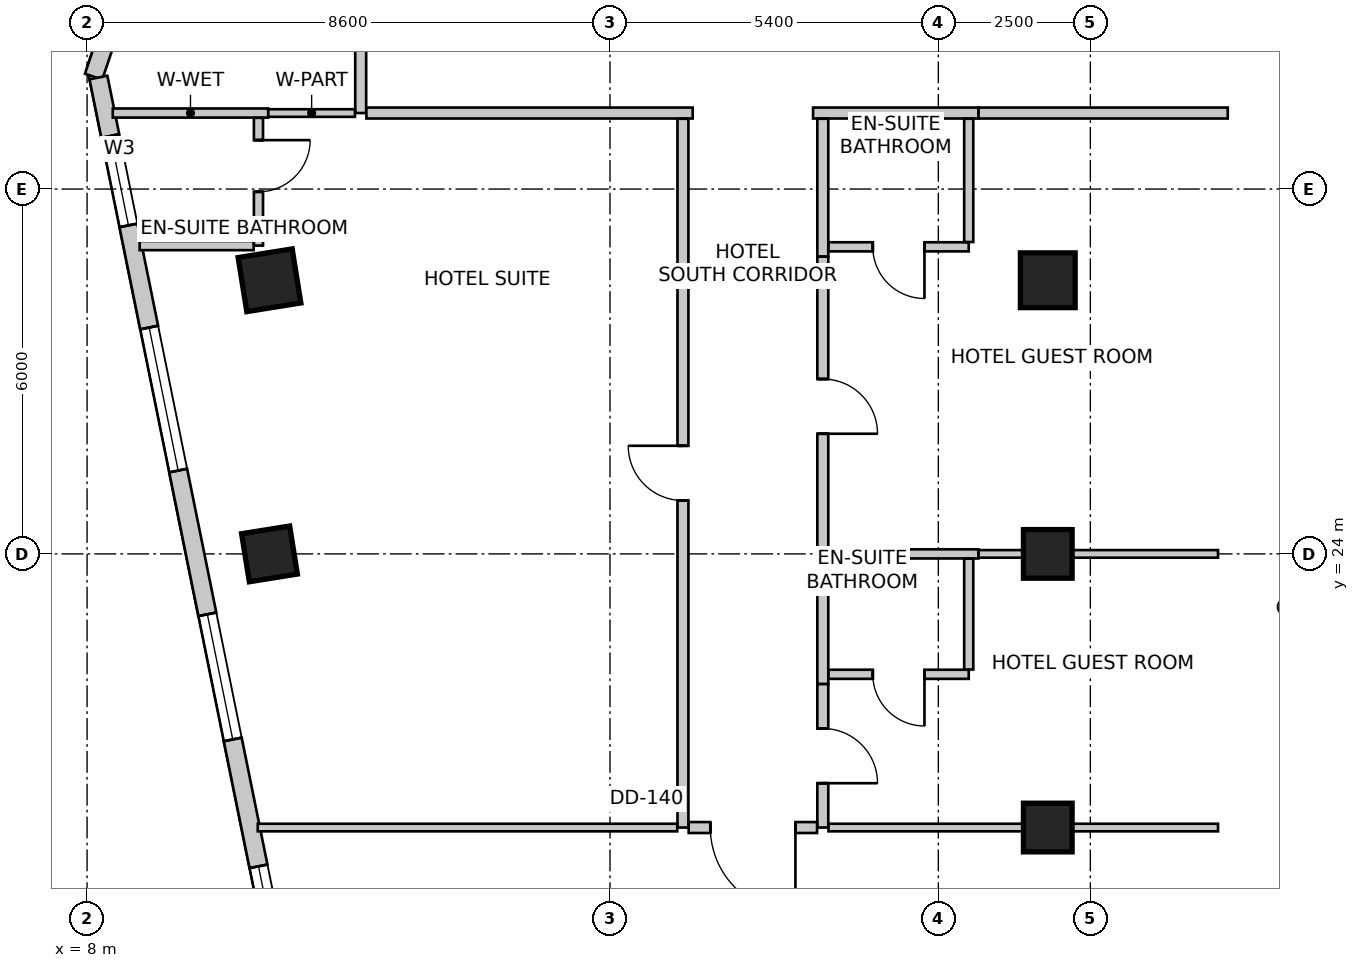
"""IFC4 building model, lengths in metres.
Left out: names, types, materials, properties, quantities, classifications, styles, units other than length and angle.
Written with IfcOpenShell. Run it as: python <this file> out.ifc"""

import sys

from ifc_helpers import new_model, si_unit, direction, frame, frame_2d, origin, origin_2d, place, context, subcontext, project, spatial, rectangle, extrude, source, transform, mapped, element, fill, save


model = new_model("IFC4")
c1 = context("Model", 3, precision=1e-05, world=origin(), true_north=direction((0.0, 1.0)))
c2 = subcontext(c1, "Body", "Model", "MODEL_VIEW")
j1 = project(units=[si_unit("LENGTHUNIT", "METRE"), si_unit("PLANEANGLEUNIT", "RADIAN")], contexts=[c1])
p1 = place(None, origin())
s1 = spatial("IfcSite", under=j1, at=p1, CompositionType="ELEMENT")
p2 = place(p1, origin())
s2 = spatial("IfcBuilding", under=s1, at=p2, CompositionType="ELEMENT")
p3 = place(p2, frame((0.0, 0.0, 143.0)))
s3 = spatial("IfcBuildingStorey", under=s2, at=p3, CompositionType="ELEMENT", Elevation=143.0)
m1 = source(origin(), c2, "Body", "SweptSolid", [
    extrude(rectangle(XDim=0.9, YDim=0.9, at=origin_2d()), origin(), (0.0, 0.0, 1.0), 3.6),
])
p4 = place(p3, frame((11.0, 28.5, 0.0), z_axis=(0.0, 0.0, 1.0), x_axis=(0.158158067254, -0.987413806751, 0.0)))
e1 = element("IfcColumn", 1, at=p4, inside=s3, PredefinedType="COLUMN", context=c2, shape_type="MappedRepresentation", body=[
    mapped(m1, transform((0.0, 0.0, 0.0), scale=1.0)),
])
m2 = source(origin(), c2, "Body", "SweptSolid", [
    extrude(rectangle(XDim=0.8, YDim=0.8, at=origin_2d()), origin(), (0.0, 0.0, 1.0), 3.6),
])
p5 = place(p3, frame((11.0, 24.0, 0.0), z_axis=(0.0, 0.0, 1.0), x_axis=(0.158158067254, -0.987413806751, 0.0)))
e2 = element("IfcColumn", 2, at=p5, inside=s3, PredefinedType="COLUMN", context=c2, shape_type="MappedRepresentation", body=[
    mapped(m2, transform((0.0, 0.0, 0.0), scale=1.0)),
])
p6 = place(p3, frame((23.8, 28.5, 0.0), z_axis=(0.0, 0.0, 1.0), x_axis=(1.0, 0.0, 0.0)))
e3 = element("IfcColumn", 3, at=p6, inside=s3, PredefinedType="COLUMN", context=c2, shape_type="MappedRepresentation", body=[
    mapped(m1, transform((0.0, 0.0, 0.0), scale=1.0)),
])
for number, where, z_axis, x_axis in (
    (4, (23.8, 24.0, 0.0), (0.0, 0.0, 1.0), (1.0, 0.0, 0.0)),
    (5, (23.8, 19.5, 0.0), (0.0, 0.0, 1.0), (1.0, 0.0, 0.0)),
):
    element("IfcColumn", number, at=place(p3, frame(where, z_axis=z_axis, x_axis=x_axis)), inside=s3, PredefinedType="COLUMN", context=c2, shape_type="MappedRepresentation", body=[
        mapped(m2, transform((0.0, 0.0, 0.0), scale=1.0)),
    ])
p7 = place(p3, frame((13.269, 47.134, 0.0), z_axis=(0.0, 0.0, 1.0), x_axis=(-0.319929773322, -0.947441259468, 0.0)))
e6 = element("IfcWall", 6, at=p7, inside=s3, PredefinedType="SOLIDWALL", context=c2, shape_type="SweptSolid", body=[
    extrude(rectangle(XDim=16.134, YDim=0.3, at=frame_2d((8.067, 0.0))), origin(), (0.0, 0.0, 1.0), 3.35),
])
m3 = source(origin(), c2, "Body", "SweptSolid", [
    extrude(rectangle(XDim=2.1, YDim=2.0, at=frame_2d((1.05, 1.0))), frame((0.0, 0.16, 0.0), z_axis=(0.0, -1.0, 0.0), x_axis=(1.0, 0.0, 0.0)), (0.0, 0.0, 1.0), 0.32),
])
p8 = place(p7, frame((2.426, 0.0, 0.85)))
e7 = element("IfcOpeningElement", 7, at=p8, cuts=e6, PredefinedType="OPENING", context=c2, shape_type="MappedRepresentation", body=[
    mapped(m3, transform((0.0, 0.0, 0.0), scale=1.0)),
])
m4 = source(origin(), c2, "Body", "SweptSolid", [
    extrude(rectangle(XDim=2.4, YDim=2.2, at=frame_2d((1.2, 1.1))), frame((0.0, 0.16, 0.0), z_axis=(0.0, -1.0, 0.0), x_axis=(1.0, 0.0, 0.0)), (0.0, 0.0, 1.0), 0.32),
])
p9 = place(p7, frame((7.211, 0.0, 0.85)))
e8 = element("IfcOpeningElement", 8, at=p9, cuts=e6, PredefinedType="OPENING", context=c2, shape_type="MappedRepresentation", body=[
    mapped(m4, transform((0.0, 0.0, 0.0), scale=1.0)),
])
p10 = place(p7, frame((12.296, 0.0, 0.85)))
e9 = element("IfcOpeningElement", 9, at=p10, cuts=e6, PredefinedType="OPENING", context=c2, shape_type="MappedRepresentation", body=[
    mapped(m3, transform((0.0, 0.0, 0.0), scale=1.0)),
])
p11 = place(p3, frame((8.187, 31.834, 0.0), z_axis=(0.0, 0.0, 1.0), x_axis=(0.198869838988, -0.980025911464, 0.0)))
e10 = element("IfcWall", 10, at=p11, inside=s3, PredefinedType="SOLIDWALL", context=c2, shape_type="SweptSolid", body=[
    extrude(rectangle(XDim=16.363, YDim=0.3, at=frame_2d((8.182, 0.0))), origin(), (0.0, 0.0, 1.0), 3.35),
])
m5 = source(origin(), c2, "Body", "SweptSolid", [
    extrude(rectangle(XDim=1.5, YDim=1.8, at=frame_2d((0.75, 0.9))), frame((0.0, 0.16, 0.0), z_axis=(0.0, -1.0, 0.0), x_axis=(1.0, 0.0, 0.0)), (0.0, 0.0, 1.0), 0.32),
])
p12 = place(p11, frame((0.981, 0.0, 0.85)))
e11 = element("IfcOpeningElement", 11, at=p12, cuts=e10, PredefinedType="OPENING", context=c2, shape_type="MappedRepresentation", body=[
    mapped(m5, transform((0.0, 0.0, 0.0), scale=1.0)),
])
p13 = place(p11, frame((4.195, 0.0, 0.85)))
e12 = element("IfcOpeningElement", 12, at=p13, cuts=e10, PredefinedType="OPENING", context=c2, shape_type="MappedRepresentation", body=[
    mapped(m4, transform((0.0, 0.0, 0.0), scale=1.0)),
])
p14 = place(p11, frame((9.007, 0.0, 0.85)))
e13 = element("IfcOpeningElement", 13, at=p14, cuts=e10, PredefinedType="OPENING", context=c2, shape_type="MappedRepresentation", body=[
    mapped(m3, transform((0.0, 0.0, 0.0), scale=1.0)),
])
p15 = place(p11, frame((13.236, 0.0, 0.85)))
e14 = element("IfcOpeningElement", 14, at=p15, cuts=e10, PredefinedType="OPENING", context=c2, shape_type="MappedRepresentation", body=[
    mapped(m4, transform((0.0, 0.0, 0.0), scale=1.0)),
])
p16 = place(p3, frame((12.5, 31.25, 0.0), z_axis=(0.0, 0.0, 1.0), x_axis=(0.0, 1.0, 0.0)))
e15 = element("IfcWall", 15, at=p16, inside=s3, PredefinedType="PARTITIONING", context=c2, shape_type="SweptSolid", body=[
    extrude(rectangle(XDim=2.2, YDim=0.18, at=frame_2d((1.1, 0.0))), origin(), (0.0, 0.0, 1.0), 3.034),
])
p17 = place(p3, frame((17.96, 31.25, 0.0), z_axis=(0.0, 0.0, 1.0), x_axis=(-1.0, 0.0, 0.0)))
e16 = element("IfcWall", 16, at=p17, inside=s3, PredefinedType="PARTITIONING", context=c2, shape_type="SweptSolid", body=[
    extrude(rectangle(XDim=5.366, YDim=0.18, at=frame_2d((2.683, 0.0))), origin(), (0.0, 0.0, 1.0), 3.034),
])
p18 = place(p3, frame((22.66, 31.25, 0.0), z_axis=(0.0, 0.0, 1.0), x_axis=(-1.0, 0.0, 0.0)))
e17 = element("IfcWall", 17, at=p18, inside=s3, PredefinedType="PARTITIONING", context=c2, shape_type="SweptSolid", body=[
    extrude(rectangle(XDim=2.72, YDim=0.18, at=frame_2d((1.36, 0.0))), origin(), (0.0, 0.0, 1.0), 3.034),
])
p19 = place(p3, frame((26.76, 31.25, 0.0), z_axis=(0.0, 0.0, 1.0), x_axis=(-1.0, 0.0, 0.0)))
e18 = element("IfcWall", 18, at=p19, inside=s3, PredefinedType="PARTITIONING", context=c2, shape_type="SweptSolid", body=[
    extrude(rectangle(XDim=4.098, YDim=0.18, at=frame_2d((2.049, 0.0))), origin(), (0.0, 0.0, 1.0), 3.35),
])
p20 = place(p3, frame((10.979, 31.25, 0.0), z_axis=(0.0, 0.0, 1.0), x_axis=(-1.0, 0.0, 0.0)))
e19 = element("IfcWall", 19, at=p20, inside=s3, PredefinedType="PARTITIONING", context=c2, shape_type="SweptSolid", body=[
    extrude(rectangle(XDim=2.556, YDim=0.15, at=frame_2d((1.278, 0.0))), origin(), (0.0, 0.0, 1.0), 2.492),
])
p21 = place(p3, frame((12.406, 31.25, 0.0), z_axis=(0.0, 0.0, 1.0), x_axis=(-1.0, 0.0, 0.0)))
e20 = element("IfcWall", 20, at=p21, inside=s3, PredefinedType="PARTITIONING", context=c2, shape_type="SweptSolid", body=[
    extrude(rectangle(XDim=1.426, YDim=0.125, at=frame_2d((0.713, 0.0))), origin(), (0.0, 0.0, 1.0), 2.492),
])
p22 = place(p3, frame((17.8, 19.5, 0.0), z_axis=(0.0, 0.0, 1.0), x_axis=(0.0, 1.0, 0.0)))
e21 = element("IfcWall", 21, at=p22, inside=s3, PredefinedType="PARTITIONING", context=c2, shape_type="SweptSolid", body=[
    extrude(rectangle(XDim=11.656, YDim=0.18, at=frame_2d((5.828, 0.0))), origin(), (0.0, 0.0, 1.0), 2.803),
])
m6 = source(origin(), c2, "Body", "SweptSolid", [
    extrude(rectangle(XDim=0.9, YDim=2.15, at=frame_2d((0.45, 1.075))), frame((0.0, 0.1, 0.0), z_axis=(0.0, -1.0, 0.0), x_axis=(1.0, 0.0, 0.0)), (0.0, 0.0, 1.0), 0.2),
])
p23 = place(p22, frame((5.378, 0.0, 0.0)))
e22 = element("IfcOpeningElement", 22, at=p23, cuts=e21, PredefinedType="OPENING", context=c2, shape_type="MappedRepresentation", body=[
    mapped(m6, transform((0.0, 0.0, 0.0), scale=1.0)),
])
p24 = place(p3, frame((20.1, 31.156, 0.0), z_axis=(0.0, 0.0, 1.0), x_axis=(0.0, -1.0, 0.0)))
e23 = element("IfcWall", 23, at=p24, inside=s3, PredefinedType="PARTITIONING", context=c2, shape_type="SweptSolid", body=[
    extrude(rectangle(XDim=2.266, YDim=0.18, at=frame_2d((1.133, 0.0))), origin(), (0.0, 0.0, 1.0), 3.034),
])
p25 = place(p3, frame((20.1, 28.888, 0.0), z_axis=(0.0, 0.0, 1.0), x_axis=(0.0, -1.0, 0.0)))
e24 = element("IfcWall", 24, at=p25, inside=s3, PredefinedType="PARTITIONING", context=c2, shape_type="SweptSolid", body=[
    extrude(rectangle(XDim=5.048, YDim=0.18, at=frame_2d((2.524, 0.0))), origin(), (0.0, 0.0, 1.0), 2.803),
])
p26 = place(p25, frame((2.012, 0.0, 0.0)))
e25 = element("IfcOpeningElement", 25, at=p26, cuts=e24, PredefinedType="OPENING", context=c2, shape_type="MappedRepresentation", body=[
    mapped(m6, transform((0.0, 0.0, 0.0), scale=1.0)),
])
p27 = place(p3, frame((20.1, 23.838, 0.0), z_axis=(0.0, 0.0, 1.0), x_axis=(0.0, -1.0, 0.0)))
e26 = element("IfcWall", 26, at=p27, inside=s3, PredefinedType="PARTITIONING", context=c2, shape_type="SweptSolid", body=[
    extrude(rectangle(XDim=1.978, YDim=0.18, at=frame_2d((0.989, 0.0))), origin(), (0.0, 0.0, 1.0), 3.35),
])
p28 = place(p3, frame((20.1, 21.858, 0.0), z_axis=(0.0, 0.0, 1.0), x_axis=(0.0, -1.0, 0.0)))
e27 = element("IfcWall", 27, at=p28, inside=s3, PredefinedType="PARTITIONING", context=c2, shape_type="SweptSolid", body=[
    extrude(rectangle(XDim=2.358, YDim=0.18, at=frame_2d((1.179, 0.0))), origin(), (0.0, 0.0, 1.0), 2.922),
])
p29 = place(p28, frame((0.729, 0.0, 0.0)))
e28 = element("IfcOpeningElement", 28, at=p29, cuts=e27, PredefinedType="OPENING", context=c2, shape_type="MappedRepresentation", body=[
    mapped(m6, transform((0.0, 0.0, 0.0), scale=1.0)),
])
p30 = place(p3, frame((20.006, 19.5, 0.0), z_axis=(0.0, 0.0, 1.0), x_axis=(-1.0, 0.0, 0.0)))
e29 = element("IfcWall", 29, at=p30, inside=s3, PredefinedType="PARTITIONING", context=c2, shape_type="SweptSolid", body=[
    extrude(rectangle(XDim=2.112, YDim=0.18, at=frame_2d((1.056, 0.0))), origin(), (0.0, 0.0, 1.0), 3.35),
])
m7 = source(origin(), c2, "Body", "SweptSolid", [
    extrude(rectangle(XDim=1.4, YDim=2.15, at=frame_2d((0.7, 1.075))), frame((0.0, 0.1, 0.0), z_axis=(0.0, -1.0, 0.0), x_axis=(1.0, 0.0, 0.0)), (0.0, 0.0, 1.0), 0.2),
])
p31 = place(p30, frame((0.356, 0.0, 0.0)))
e30 = element("IfcOpeningElement", 30, at=p31, cuts=e29, PredefinedType="OPENING", context=c2, shape_type="MappedRepresentation", body=[
    mapped(m7, transform((0.0, 0.0, 0.0), scale=1.0)),
])
p32 = place(p3, frame((10.819, 31.171, 0.0), z_axis=(0.0, 0.0, 1.0), x_axis=(0.0, -1.0, 0.0)))
e31 = element("IfcWall", 31, at=p32, inside=s3, PredefinedType="PARTITIONING", context=c2, shape_type="SweptSolid", body=[
    extrude(rectangle(XDim=2.101, YDim=0.15, at=frame_2d((1.05, 0.0))), origin(), (0.0, 0.0, 1.0), 2.492),
])
m8 = source(origin(), c2, "Body", "SweptSolid", [
    extrude(rectangle(XDim=0.85, YDim=2.15, at=frame_2d((0.425, 1.075))), frame((0.0, 0.085, 0.0), z_axis=(0.0, -1.0, 0.0), x_axis=(1.0, 0.0, 0.0)), (0.0, 0.0, 1.0), 0.17),
])
p33 = place(p32, frame((0.366, 0.0, 0.0)))
e32 = element("IfcOpeningElement", 32, at=p33, cuts=e31, PredefinedType="OPENING", context=c2, shape_type="MappedRepresentation", body=[
    mapped(m8, transform((0.0, 0.0, 0.0), scale=1.0)),
])
p34 = place(p3, frame((10.74, 29.07, 0.0), z_axis=(0.0, 0.0, 1.0), x_axis=(-1.0, 0.0, 0.0)))
e33 = element("IfcWall", 33, at=p34, inside=s3, PredefinedType="PARTITIONING", context=c2, shape_type="SweptSolid", body=[
    extrude(rectangle(XDim=1.875, YDim=0.15, at=frame_2d((0.937, 0.0))), origin(), (0.0, 0.0, 1.0), 3.35),
])
p35 = place(p3, frame((17.706, 19.5, 0.0), z_axis=(0.0, 0.0, 1.0), x_axis=(-1.0, 0.0, 0.0)))
e34 = element("IfcWall", 34, at=p35, inside=s3, PredefinedType="PARTITIONING", context=c2, shape_type="SweptSolid", body=[
    extrude(rectangle(XDim=6.899, YDim=0.125, at=frame_2d((3.45, 0.0))), origin(), (0.0, 0.0, 1.0), 3.35),
])
p36 = place(p3, frame((22.5, 29.05, 0.0), z_axis=(0.0, 0.0, 1.0), x_axis=(-1.0, 0.0, 0.0)))
e35 = element("IfcWall", 35, at=p36, inside=s3, PredefinedType="PARTITIONING", context=c2, shape_type="SweptSolid", body=[
    extrude(rectangle(XDim=2.306, YDim=0.15, at=frame_2d((1.153, 0.0))), origin(), (0.0, 0.0, 1.0), 3.034),
])
p37 = place(p36, frame((0.728, 0.0, 0.0)))
e36 = element("IfcOpeningElement", 36, at=p37, cuts=e35, PredefinedType="OPENING", context=c2, shape_type="MappedRepresentation", body=[
    mapped(m8, transform((0.0, 0.0, 0.0), scale=1.0)),
])
p38 = place(p3, frame((22.5, 31.156, 0.0), z_axis=(0.0, 0.0, 1.0), x_axis=(0.0, -1.0, 0.0)))
e37 = element("IfcWall", 37, at=p38, inside=s3, PredefinedType="PARTITIONING", context=c2, shape_type="SweptSolid", body=[
    extrude(rectangle(XDim=2.027, YDim=0.15, at=frame_2d((1.014, 0.0))), origin(), (0.0, 0.0, 1.0), 3.034),
])
p39 = place(p3, frame((22.66, 24.0, 0.0), z_axis=(0.0, 0.0, 1.0), x_axis=(-1.0, 0.0, 0.0)))
e38 = element("IfcWall", 38, at=p39, inside=s3, PredefinedType="PARTITIONING", context=c2, shape_type="SweptSolid", body=[
    extrude(rectangle(XDim=2.466, YDim=0.15, at=frame_2d((1.233, 0.0))), origin(), (0.0, 0.0, 1.0), 2.803),
])
p40 = place(p3, frame((26.6, 24.0, 0.0), z_axis=(0.0, 0.0, 1.0), x_axis=(-1.0, 0.0, 0.0)))
e39 = element("IfcWall", 39, at=p40, inside=s3, PredefinedType="PARTITIONING", context=c2, shape_type="SweptSolid", body=[
    extrude(rectangle(XDim=3.938, YDim=0.125, at=frame_2d((1.969, 0.0))), origin(), (0.0, 0.0, 1.0), 2.492),
])
p41 = place(p3, frame((22.5, 22.02, 0.0), z_axis=(0.0, 0.0, 1.0), x_axis=(-1.0, 0.0, 0.0)))
e40 = element("IfcWall", 40, at=p41, inside=s3, PredefinedType="PARTITIONING", context=c2, shape_type="SweptSolid", body=[
    extrude(rectangle(XDim=2.306, YDim=0.15, at=frame_2d((1.153, 0.0))), origin(), (0.0, 0.0, 1.0), 3.35),
])
p42 = place(p41, frame((0.728, 0.0, 0.0)))
e41 = element("IfcOpeningElement", 41, at=p42, cuts=e40, PredefinedType="OPENING", context=c2, shape_type="MappedRepresentation", body=[
    mapped(m8, transform((0.0, 0.0, 0.0), scale=1.0)),
])
p43 = place(p3, frame((22.5, 23.921, 0.0), z_axis=(0.0, 0.0, 1.0), x_axis=(0.0, -1.0, 0.0)))
e42 = element("IfcWall", 42, at=p43, inside=s3, PredefinedType="PARTITIONING", context=c2, shape_type="SweptSolid", body=[
    extrude(rectangle(XDim=1.822, YDim=0.15, at=frame_2d((0.911, 0.0))), origin(), (0.0, 0.0, 1.0), 3.35),
])
p44 = place(p3, frame((26.6, 19.5, 0.0), z_axis=(0.0, 0.0, 1.0), x_axis=(-1.0, 0.0, 0.0)))
e43 = element("IfcWall", 43, at=p44, inside=s3, PredefinedType="PARTITIONING", context=c2, shape_type="SweptSolid", body=[
    extrude(rectangle(XDim=6.406, YDim=0.125, at=frame_2d((3.203, 0.0))), origin(), (0.0, 0.0, 1.0), 2.492),
])
m9 = source(origin(), c2, "Body", "SweptSolid", [
    extrude(rectangle(XDim=1.5, YDim=1.8, at=frame_2d((0.75, 0.9))), frame((0.0, -0.015, 0.0), z_axis=(0.0, -1.0, 0.0), x_axis=(1.0, 0.0, 0.0)), (0.0, 0.0, 1.0), 0.06),
])
p45 = place(p12, origin())
e44 = element("IfcWindow", 44, at=p45, inside=s3, PartitioningType="SINGLE_PANEL", PredefinedType="WINDOW", context=c2, shape_type="MappedRepresentation", body=[
    mapped(m9, transform((0.0, 0.0, 0.0), scale=1.0)),
])
fill(e11, e44)
m10 = source(origin(), c2, "Body", "SweptSolid", [
    extrude(rectangle(XDim=2.4, YDim=2.2, at=frame_2d((1.2, 1.1))), frame((0.0, -0.015, 0.0), z_axis=(0.0, -1.0, 0.0), x_axis=(1.0, 0.0, 0.0)), (0.0, 0.0, 1.0), 0.06),
])
p46 = place(p13, origin())
e45 = element("IfcWindow", 45, at=p46, inside=s3, PartitioningType="SINGLE_PANEL", PredefinedType="WINDOW", context=c2, shape_type="MappedRepresentation", body=[
    mapped(m10, transform((0.0, 0.0, 0.0), scale=1.0)),
])
fill(e12, e45)
m11 = source(origin(), c2, "Body", "SweptSolid", [
    extrude(rectangle(XDim=2.1, YDim=2.0, at=frame_2d((1.05, 1.0))), frame((0.0, -0.015, 0.0), z_axis=(0.0, -1.0, 0.0), x_axis=(1.0, 0.0, 0.0)), (0.0, 0.0, 1.0), 0.06),
])
p47 = place(p14, origin())
e46 = element("IfcWindow", 46, at=p47, inside=s3, PartitioningType="SINGLE_PANEL", PredefinedType="WINDOW", context=c2, shape_type="MappedRepresentation", body=[
    mapped(m11, transform((0.0, 0.0, 0.0), scale=1.0)),
])
fill(e13, e46)
p48 = place(p15, origin())
e47 = element("IfcWindow", 47, at=p48, inside=s3, PartitioningType="SINGLE_PANEL", PredefinedType="WINDOW", context=c2, shape_type="MappedRepresentation", body=[
    mapped(m10, transform((0.0, 0.0, 0.0), scale=1.0)),
])
fill(e14, e47)
m12 = source(origin(), c2, "Body", "SweptSolid", [
    extrude(rectangle(XDim=0.85, YDim=2.15, at=frame_2d((0.425, 1.075))), frame((0.0, 0.025, 0.0), z_axis=(0.0, -1.0, 0.0), x_axis=(1.0, 0.0, 0.0)), (0.0, 0.0, 1.0), 0.05),
])
p49 = place(p33, origin())
e48 = element("IfcDoor", 48, at=p49, inside=s3, OperationType="SINGLE_SWING_LEFT", PredefinedType="DOOR", context=c2, shape_type="MappedRepresentation", body=[
    mapped(m12, transform((0.0, 0.0, 0.0), scale=1.0)),
])
fill(e32, e48)
m13 = source(origin(), c2, "Body", "SweptSolid", [
    extrude(rectangle(XDim=0.9, YDim=2.15, at=frame_2d((0.45, 1.075))), frame((0.0, 0.025, 0.0), z_axis=(0.0, -1.0, 0.0), x_axis=(1.0, 0.0, 0.0)), (0.0, 0.0, 1.0), 0.05),
])
p50 = place(p23, origin())
e49 = element("IfcDoor", 49, at=p50, inside=s3, OperationType="SINGLE_SWING_RIGHT", PredefinedType="DOOR", context=c2, shape_type="MappedRepresentation", body=[
    mapped(m13, transform((0.0, 0.0, 0.0), scale=1.0)),
])
fill(e22, e49)
p51 = place(p37, origin())
e50 = element("IfcDoor", 50, at=p51, inside=s3, OperationType="SINGLE_SWING_LEFT", PredefinedType="DOOR", context=c2, shape_type="MappedRepresentation", body=[
    mapped(m12, transform((0.0, 0.0, 0.0), scale=1.0)),
])
fill(e36, e50)
p52 = place(p26, origin())
e51 = element("IfcDoor", 51, at=p52, inside=s3, OperationType="SINGLE_SWING_RIGHT", PredefinedType="DOOR", context=c2, shape_type="MappedRepresentation", body=[
    mapped(m13, transform((0.0, 0.0, 0.0), scale=1.0)),
])
fill(e25, e51)
p53 = place(p42, origin())
e52 = element("IfcDoor", 52, at=p53, inside=s3, OperationType="SINGLE_SWING_LEFT", PredefinedType="DOOR", context=c2, shape_type="MappedRepresentation", body=[
    mapped(m12, transform((0.0, 0.0, 0.0), scale=1.0)),
])
fill(e41, e52)
p54 = place(p29, origin())
e53 = element("IfcDoor", 53, at=p54, inside=s3, OperationType="SINGLE_SWING_RIGHT", PredefinedType="DOOR", context=c2, shape_type="MappedRepresentation", body=[
    mapped(m13, transform((0.0, 0.0, 0.0), scale=1.0)),
])
fill(e28, e53)
m14 = source(origin(), c2, "Body", "SweptSolid", [
    extrude(rectangle(XDim=1.4, YDim=2.15, at=frame_2d((0.7, 1.075))), frame((0.0, 0.025, 0.0), z_axis=(0.0, -1.0, 0.0), x_axis=(1.0, 0.0, 0.0)), (0.0, 0.0, 1.0), 0.05),
])
p55 = place(p31, origin())
e54 = element("IfcDoor", 54, at=p55, inside=s3, OperationType="SINGLE_SWING_LEFT", PredefinedType="DOOR", context=c2, shape_type="MappedRepresentation", body=[
    mapped(m14, transform((0.0, 0.0, 0.0), scale=1.0)),
])
fill(e30, e54)
save(model, sys.argv[1])
